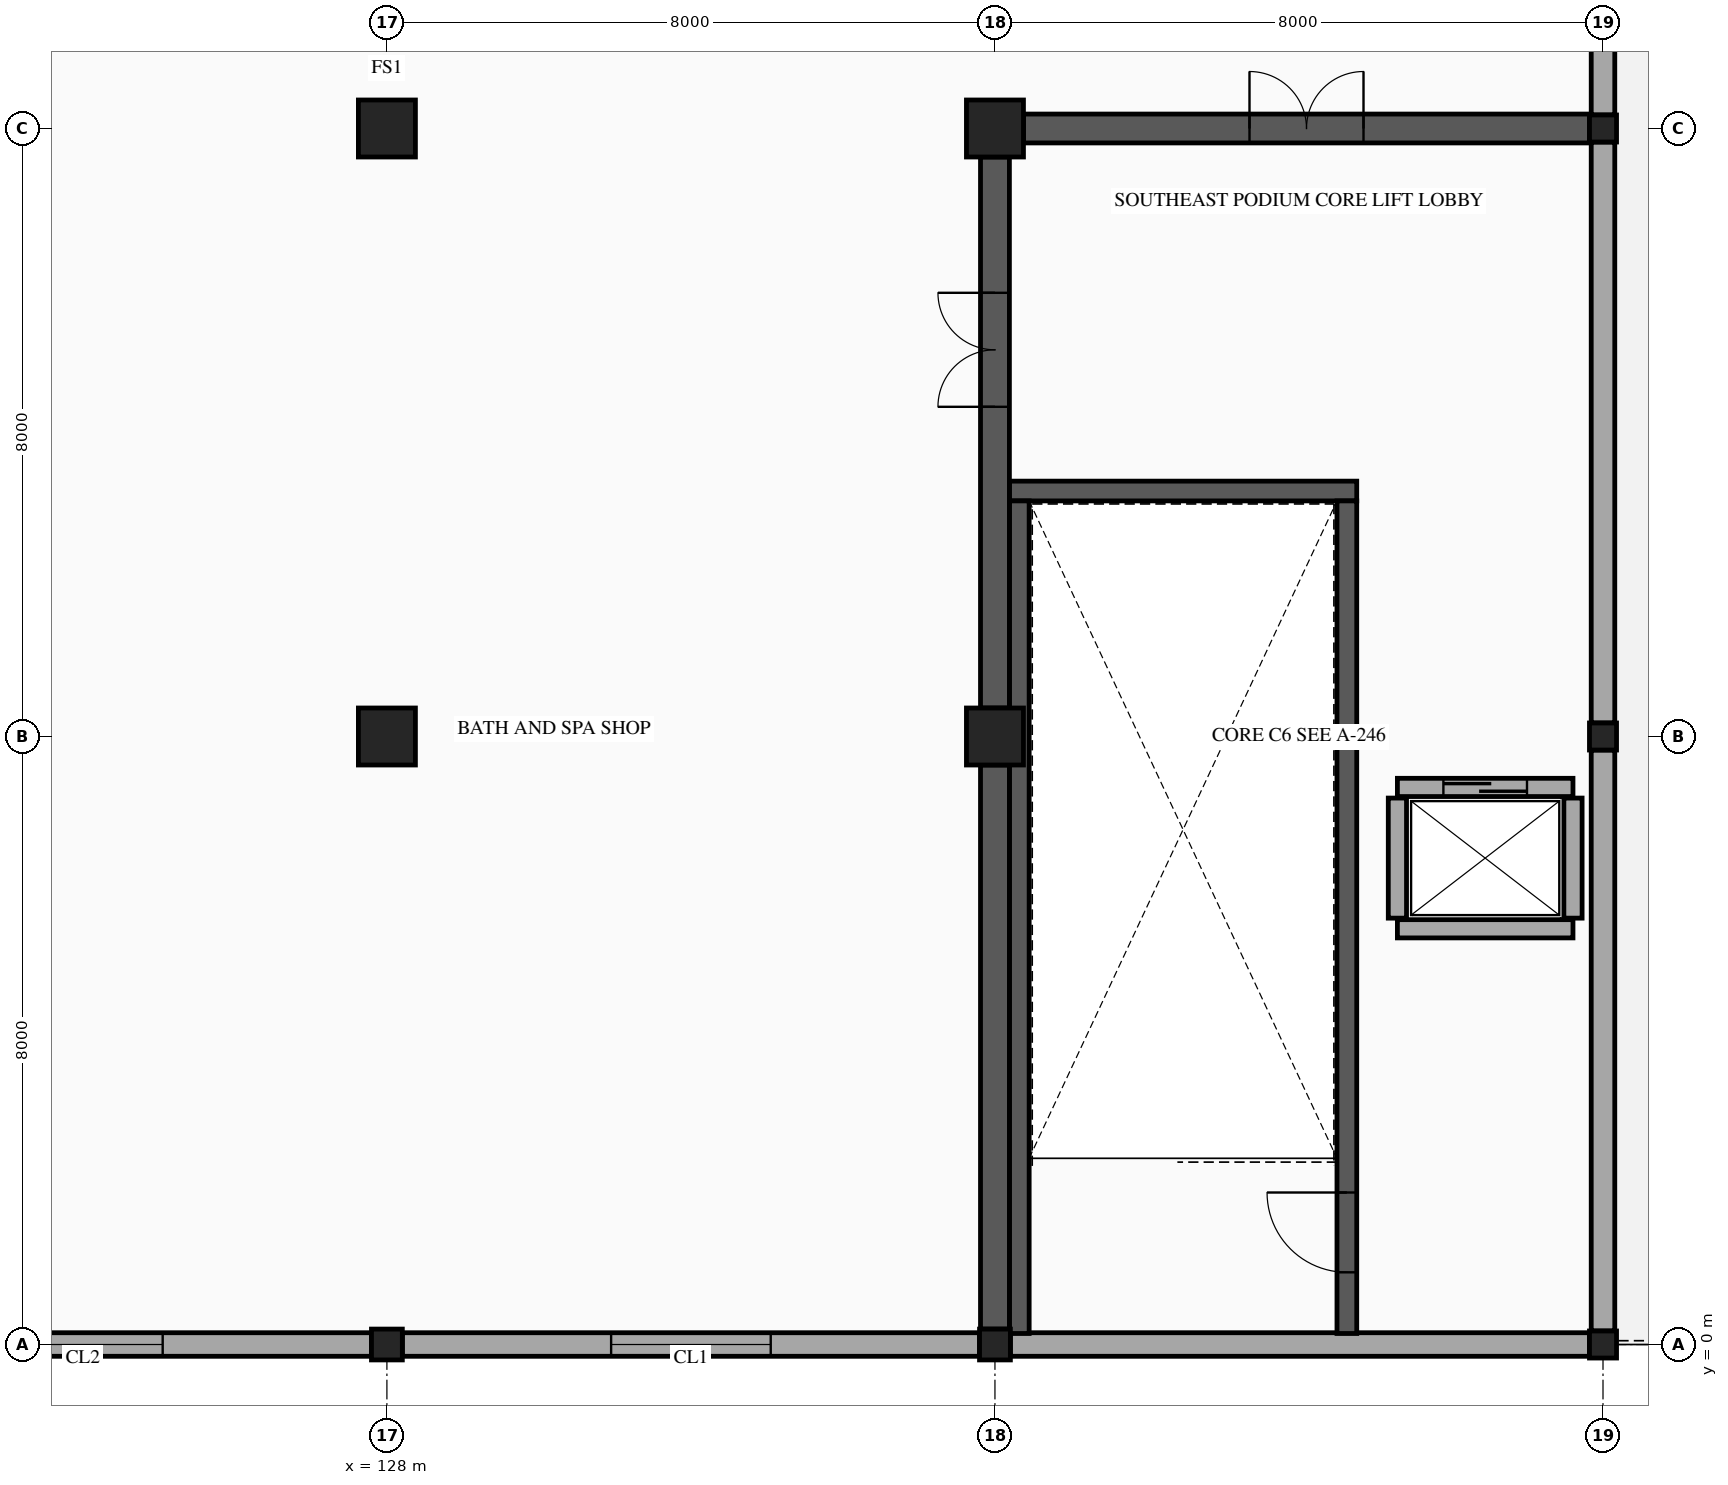
"""IFC4 building model, lengths in metres.
Left out: names, types, materials, properties, quantities, classifications, styles, units other than length and angle.
Written with IfcOpenShell. Run it as: python <this file> out.ifc"""

import sys

from ifc_helpers import new_model, si_unit, direction, frame, frame_2d, origin, origin_2d, place, context, subcontext, project, spatial, rectangle, hollow_rectangle, extrude, element, fill, save


model = new_model("IFC4")
c1 = context("Model", 3, precision=1e-05, world=origin(), true_north=direction((0.0, 1.0)))
c2 = subcontext(c1, "Body", "Model", "MODEL_VIEW")
j1 = project(units=[si_unit("LENGTHUNIT", "METRE"), si_unit("PLANEANGLEUNIT", "RADIAN")], contexts=[c1])
p1 = place(None, origin())
s1 = spatial("IfcSite", under=j1, at=p1, CompositionType="ELEMENT")
p2 = place(p1, origin())
s2 = spatial("IfcBuilding", under=s1, at=p2, CompositionType="ELEMENT")
p3 = place(p2, frame((0.0, 0.0, 14.9)))
s3 = spatial("IfcBuildingStorey", under=s2, at=p3, CompositionType="ELEMENT", Elevation=14.9)
p4 = place(p3, frame((128.0, 0.0, 0.0), z_axis=(0.0, 0.0, 1.0), x_axis=(1.0, 0.0, 0.0)))
e1 = element("IfcColumn", 1, at=p4, inside=s3, PredefinedType="COLUMN", context=c2, shape_type="SweptSolid", body=[
    extrude(hollow_rectangle(XDim=0.406, YDim=0.406, WallThickness=0.015, InnerFilletRadius=0.015, OuterFilletRadius=0.029, at=origin_2d()), origin(), (0.0, 0.0, 1.0), 4.5),
])
for number, where, z_axis, x_axis in (
    (2, (128.0, 8.0, 0.0), (0.0, 0.0, 1.0), (1.0, 0.0, 0.0)),
    (3, (128.0, 16.0, 0.0), (0.0, 0.0, 1.0), (1.0, 0.0, 0.0)),
):
    element("IfcColumn", number, at=place(p3, frame(where, z_axis=z_axis, x_axis=x_axis)), inside=s3, PredefinedType="COLUMN", context=c2, shape_type="SweptSolid", body=[
        extrude(rectangle(XDim=0.75, YDim=0.75, at=origin_2d()), origin(), (0.0, 0.0, 1.0), 4.5),
    ])
p5 = place(p3, frame((136.0, 0.0, 0.0), z_axis=(0.0, 0.0, 1.0), x_axis=(1.0, 0.0, 0.0)))
e4 = element("IfcColumn", 4, at=p5, inside=s3, PredefinedType="COLUMN", context=c2, shape_type="SweptSolid", body=[
    extrude(hollow_rectangle(XDim=0.406, YDim=0.406, WallThickness=0.015, InnerFilletRadius=0.015, OuterFilletRadius=0.029, at=origin_2d()), origin(), (0.0, 0.0, 1.0), 4.5),
])
for number, where, z_axis, x_axis in (
    (5, (136.0, 8.0, 0.0), (0.0, 0.0, 1.0), (1.0, 0.0, 0.0)),
    (6, (136.0, 16.0, 0.0), (0.0, 0.0, 1.0), (1.0, 0.0, 0.0)),
):
    element("IfcColumn", number, at=place(p3, frame(where, z_axis=z_axis, x_axis=x_axis)), inside=s3, PredefinedType="COLUMN", context=c2, shape_type="SweptSolid", body=[
        extrude(rectangle(XDim=0.75, YDim=0.75, at=origin_2d()), origin(), (0.0, 0.0, 1.0), 4.5),
    ])
for number, where, z_axis, x_axis in (
    (7, (144.0, 0.0, 0.0), (0.0, 0.0, 1.0), (1.0, 0.0, 0.0)),
    (8, (144.0, 8.0, 0.0), (0.0, 0.0, 1.0), (1.0, 0.0, 0.0)),
    (9, (144.0, 16.0, 0.0), (0.0, 0.0, 1.0), (1.0, 0.0, 0.0)),
):
    element("IfcColumn", number, at=place(p3, frame(where, z_axis=z_axis, x_axis=x_axis)), inside=s3, PredefinedType="COLUMN", context=c2, shape_type="SweptSolid", body=[
        extrude(hollow_rectangle(XDim=0.356, YDim=0.356, WallThickness=0.012, InnerFilletRadius=0.012, OuterFilletRadius=0.024, at=origin_2d()), origin(), (0.0, 0.0, 1.0), 4.5),
    ])
p6 = place(p3, frame((144.0, 23.822, 0.0), z_axis=(0.0, 0.0, 1.0), x_axis=(0.0, -1.0, 0.0)))
e10 = element("IfcWall", 10, at=p6, inside=s3, PredefinedType="STANDARD", context=c2, shape_type="SweptSolid", body=[
    extrude(rectangle(XDim=7.644, YDim=0.31, at=frame_2d((3.822, 0.0))), origin(), (0.0, 0.0, 1.0), 3.48),
])
p7 = place(p6, frame((3.272, 0.0, 0.0)))
e11 = element("IfcOpeningElement", 11, at=p7, cuts=e10, PredefinedType="OPENING", context=c2, shape_type="SweptSolid", body=[
    extrude(rectangle(XDim=1.1, YDim=2.15, at=frame_2d((0.55, 1.075))), frame((0.0, 0.165, 0.0), z_axis=(0.0, -1.0, 0.0), x_axis=(1.0, 0.0, 0.0)), (0.0, 0.0, 1.0), 0.33),
])
for number, where, z_axis, x_axis in (
    (12, (144.0, 15.822, 0.0), (0.0, 0.0, 1.0), (0.0, -1.0, 0.0)),
    (13, (144.0, 7.822, 0.0), (0.0, 0.0, 1.0), (0.0, -1.0, 0.0)),
):
    element("IfcWall", number, at=place(p3, frame(where, z_axis=z_axis, x_axis=x_axis)), inside=s3, PredefinedType="STANDARD", context=c2, shape_type="SweptSolid", body=[
        extrude(rectangle(XDim=7.644, YDim=0.31, at=frame_2d((3.822, 0.0))), origin(), (0.0, 0.0, 1.0), 3.48),
    ])
p8 = place(p3, frame((143.822, 0.0, 0.0), z_axis=(0.0, 0.0, 1.0), x_axis=(-1.0, 0.0, 0.0)))
e14 = element("IfcWall", 14, at=p8, inside=s3, PredefinedType="STANDARD", context=c2, shape_type="SweptSolid", body=[
    extrude(rectangle(XDim=7.619, YDim=0.31, at=frame_2d((3.81, 0.0))), origin(), (0.0, 0.0, 1.0), 3.48),
])
p9 = place(p3, frame((135.797, 0.0, 0.0), z_axis=(0.0, 0.0, 1.0), x_axis=(-1.0, 0.0, 0.0)))
e15 = element("IfcWall", 15, at=p9, inside=s3, PredefinedType="STANDARD", context=c2, shape_type="SweptSolid", body=[
    extrude(rectangle(XDim=7.594, YDim=0.31, at=frame_2d((3.797, 0.0))), origin(), (0.0, 0.0, 1.0), 3.48),
])
p10 = place(p9, frame((2.747, 0.0, 0.8)))
e16 = element("IfcOpeningElement", 16, at=p10, cuts=e15, PredefinedType="OPENING", context=c2, shape_type="SweptSolid", body=[
    extrude(rectangle(XDim=2.1, YDim=1.9, at=frame_2d((1.05, 0.95))), frame((0.0, 0.165, 0.0), z_axis=(0.0, -1.0, 0.0), x_axis=(1.0, 0.0, 0.0)), (0.0, 0.0, 1.0), 0.33),
])
p11 = place(p3, frame((127.797, 0.0, 0.0), z_axis=(0.0, 0.0, 1.0), x_axis=(-1.0, 0.0, 0.0)))
e17 = element("IfcWall", 17, at=p11, inside=s3, PredefinedType="STANDARD", context=c2, shape_type="SweptSolid", body=[
    extrude(rectangle(XDim=7.594, YDim=0.31, at=frame_2d((3.797, 0.0))), origin(), (0.0, 0.0, 1.0), 3.48),
])
p12 = place(p11, frame((2.747, 0.0, 0.8)))
e18 = element("IfcOpeningElement", 18, at=p12, cuts=e17, PredefinedType="OPENING", context=c2, shape_type="SweptSolid", body=[
    extrude(rectangle(XDim=2.1, YDim=1.9, at=frame_2d((1.05, 0.95))), frame((0.0, 0.165, 0.0), z_axis=(0.0, -1.0, 0.0), x_axis=(1.0, 0.0, 0.0)), (0.0, 0.0, 1.0), 0.33),
])
p13 = place(p3, frame((136.19, 11.23, 0.0), z_axis=(0.0, 0.0, 1.0), x_axis=(1.0, 0.0, 0.0)))
e19 = element("IfcWall", 19, at=p13, inside=s3, PredefinedType="SHEAR", context=c2, shape_type="SweptSolid", body=[
    extrude(rectangle(XDim=4.57, YDim=0.26, at=frame_2d((2.285, 0.0))), origin(), (0.0, 0.0, 1.0), 4.28),
])
p14 = place(p3, frame((136.32, 0.145, 0.0), z_axis=(0.0, 0.0, 1.0), x_axis=(0.0, 1.0, 0.0)))
e20 = element("IfcWall", 20, at=p14, inside=s3, PredefinedType="SHEAR", context=c2, shape_type="SweptSolid", body=[
    extrude(rectangle(XDim=10.955, YDim=0.26, at=frame_2d((5.478, 0.0))), origin(), (0.0, 0.0, 1.0), 4.28),
])
p15 = place(p3, frame((140.63, 0.145, 0.0), z_axis=(0.0, 0.0, 1.0), x_axis=(0.0, 1.0, 0.0)))
e21 = element("IfcWall", 21, at=p15, inside=s3, PredefinedType="SHEAR", context=c2, shape_type="SweptSolid", body=[
    extrude(rectangle(XDim=10.955, YDim=0.26, at=frame_2d((5.478, 0.0))), origin(), (0.0, 0.0, 1.0), 4.28),
])
p16 = place(p15, frame((0.805, 0.0, 0.0)))
e22 = element("IfcOpeningElement", 22, at=p16, cuts=e21, PredefinedType="OPENING", context=c2, shape_type="SweptSolid", body=[
    extrude(rectangle(XDim=1.05, YDim=2.15, at=frame_2d((0.525, 1.075))), frame((0.0, 0.14, 0.0), z_axis=(0.0, -1.0, 0.0), x_axis=(1.0, 0.0, 0.0)), (0.0, 0.0, 1.0), 0.28),
])
p17 = place(p3, frame((136.375, 16.0, 0.0), z_axis=(0.0, 0.0, 1.0), x_axis=(1.0, 0.0, 0.0)))
e23 = element("IfcWall", 23, at=p17, inside=s3, PredefinedType="SHEAR", context=c2, shape_type="SweptSolid", body=[
    extrude(rectangle(XDim=7.447, YDim=0.38, at=frame_2d((3.724, 0.0))), origin(), (0.0, 0.0, 1.0), 4.28),
])
p18 = place(p17, frame((2.974, 0.0, 0.0)))
e24 = element("IfcOpeningElement", 24, at=p18, cuts=e23, PredefinedType="OPENING", context=c2, shape_type="SweptSolid", body=[
    extrude(rectangle(XDim=1.5, YDim=2.15, at=frame_2d((0.75, 1.075))), frame((0.0, 0.2, 0.0), z_axis=(0.0, -1.0, 0.0), x_axis=(1.0, 0.0, 0.0)), (0.0, 0.0, 1.0), 0.4),
])
p19 = place(p3, frame((136.0, 0.203, 0.0), z_axis=(0.0, 0.0, 1.0), x_axis=(0.0, 1.0, 0.0)))
e25 = element("IfcWall", 25, at=p19, inside=s3, PredefinedType="SHEAR", context=c2, shape_type="SweptSolid", body=[
    extrude(rectangle(XDim=7.422, YDim=0.38, at=frame_2d((3.711, 0.0))), origin(), (0.0, 0.0, 1.0), 4.28),
])
p20 = place(p3, frame((136.0, 8.375, 0.0), z_axis=(0.0, 0.0, 1.0), x_axis=(0.0, 1.0, 0.0)))
e26 = element("IfcWall", 26, at=p20, inside=s3, PredefinedType="SHEAR", context=c2, shape_type="SweptSolid", body=[
    extrude(rectangle(XDim=7.25, YDim=0.38, at=frame_2d((3.625, 0.0))), origin(), (0.0, 0.0, 1.0), 4.28),
])
p21 = place(p20, frame((3.963, 0.0, 0.0)))
e27 = element("IfcOpeningElement", 27, at=p21, cuts=e26, PredefinedType="OPENING", context=c2, shape_type="SweptSolid", body=[
    extrude(rectangle(XDim=1.5, YDim=2.15, at=frame_2d((0.75, 1.075))), frame((0.0, 0.2, 0.0), z_axis=(0.0, -1.0, 0.0), x_axis=(1.0, 0.0, 0.0)), (0.0, 0.0, 1.0), 0.4),
])
p22 = place(p3, frame((141.295, 7.33, 0.0), z_axis=(0.0, 0.0, 1.0), x_axis=(1.0, 0.0, 0.0)))
e28 = element("IfcWall", 28, at=p22, inside=s3, PredefinedType="PARTITIONING", context=c2, shape_type="SweptSolid", body=[
    extrude(rectangle(XDim=2.31, YDim=0.24, at=frame_2d((1.155, 0.0))), origin(), (0.0, 0.0, 1.0), 4.28),
])
p23 = place(p22, frame((0.605, 0.0, 0.0)))
e29 = element("IfcOpeningElement", 29, at=p23, cuts=e28, PredefinedType="OPENING", context=c2, shape_type="SweptSolid", body=[
    extrude(rectangle(XDim=1.1, YDim=2.15, at=frame_2d((0.55, 1.075))), frame((0.0, 0.13, 0.0), z_axis=(0.0, -1.0, 0.0), x_axis=(1.0, 0.0, 0.0)), (0.0, 0.0, 1.0), 0.26),
])
p24 = place(p3, frame((141.295, 5.47, 0.0), z_axis=(0.0, 0.0, 1.0), x_axis=(1.0, 0.0, 0.0)))
e30 = element("IfcWall", 30, at=p24, inside=s3, PredefinedType="PARTITIONING", context=c2, shape_type="SweptSolid", body=[
    extrude(rectangle(XDim=2.31, YDim=0.24, at=frame_2d((1.155, 0.0))), origin(), (0.0, 0.0, 1.0), 4.28),
])
for number, where, z_axis, x_axis in (
    (31, (141.295, 5.61, 0.0), (0.0, 0.0, 1.0), (0.0, 1.0, 0.0)),
    (32, (143.605, 5.61, 0.0), (0.0, 0.0, 1.0), (0.0, 1.0, 0.0)),
):
    element("IfcWall", number, at=place(p3, frame(where, z_axis=z_axis, x_axis=x_axis)), inside=s3, PredefinedType="PARTITIONING", context=c2, shape_type="SweptSolid", body=[
        extrude(rectangle(XDim=1.58, YDim=0.24, at=frame_2d((0.79, 0.0))), origin(), (0.0, 0.0, 1.0), 4.28),
    ])
p25 = place(p10, origin())
e33 = element("IfcWindow", 33, at=p25, inside=s3, PartitioningType="DOUBLE_PANEL_VERTICAL", PredefinedType="WINDOW", context=c2, shape_type="SweptSolid", body=[
    extrude(rectangle(XDim=2.1, YDim=1.9, at=frame_2d((1.05, 0.95))), frame((0.0, 0.03, 0.0), z_axis=(0.0, -1.0, 0.0), x_axis=(1.0, 0.0, 0.0)), (0.0, 0.0, 1.0), 0.06),
])
fill(e16, e33)
p26 = place(p12, origin())
e34 = element("IfcWindow", 34, at=p26, inside=s3, PartitioningType="DOUBLE_PANEL_VERTICAL", PredefinedType="WINDOW", context=c2, shape_type="SweptSolid", body=[
    extrude(rectangle(XDim=2.1, YDim=1.9, at=frame_2d((1.05, 0.95))), frame((0.0, 0.03, 0.0), z_axis=(0.0, -1.0, 0.0), x_axis=(1.0, 0.0, 0.0)), (0.0, 0.0, 1.0), 0.06),
])
fill(e18, e34)
p27 = place(p16, origin())
e35 = element("IfcDoor", 35, at=p27, inside=s3, OperationType="SINGLE_SWING_RIGHT", PredefinedType="DOOR", context=c2, shape_type="SweptSolid", body=[
    extrude(rectangle(XDim=1.05, YDim=2.15, at=frame_2d((0.525, 1.075))), frame((0.0, 0.025, 0.0), z_axis=(0.0, -1.0, 0.0), x_axis=(1.0, 0.0, 0.0)), (0.0, 0.0, 1.0), 0.05),
])
fill(e22, e35)
p28 = place(p18, origin())
e36 = element("IfcDoor", 36, at=p28, inside=s3, OperationType="DOUBLE_DOOR_SINGLE_SWING", PredefinedType="DOOR", context=c2, shape_type="SweptSolid", body=[
    extrude(rectangle(XDim=1.5, YDim=2.15, at=frame_2d((0.75, 1.075))), frame((0.0, 0.025, 0.0), z_axis=(0.0, -1.0, 0.0), x_axis=(1.0, 0.0, 0.0)), (0.0, 0.0, 1.0), 0.05),
])
fill(e24, e36)
p29 = place(p21, origin())
e37 = element("IfcDoor", 37, at=p29, inside=s3, OperationType="DOUBLE_DOOR_SINGLE_SWING", PredefinedType="DOOR", context=c2, shape_type="SweptSolid", body=[
    extrude(rectangle(XDim=1.5, YDim=2.15, at=frame_2d((0.75, 1.075))), frame((0.0, 0.025, 0.0), z_axis=(0.0, -1.0, 0.0), x_axis=(1.0, 0.0, 0.0)), (0.0, 0.0, 1.0), 0.05),
])
fill(e27, e37)
p30 = place(p23, origin())
e38 = element("IfcDoor", 38, at=p30, inside=s3, OperationType="SLIDING_TO_LEFT", PredefinedType="DOOR", context=c2, shape_type="SweptSolid", body=[
    extrude(rectangle(XDim=1.1, YDim=2.15, at=frame_2d((0.55, 1.075))), frame((0.0, 0.025, 0.0), z_axis=(0.0, -1.0, 0.0), x_axis=(1.0, 0.0, 0.0)), (0.0, 0.0, 1.0), 0.05),
])
fill(e29, e38)
save(model, sys.argv[1])
